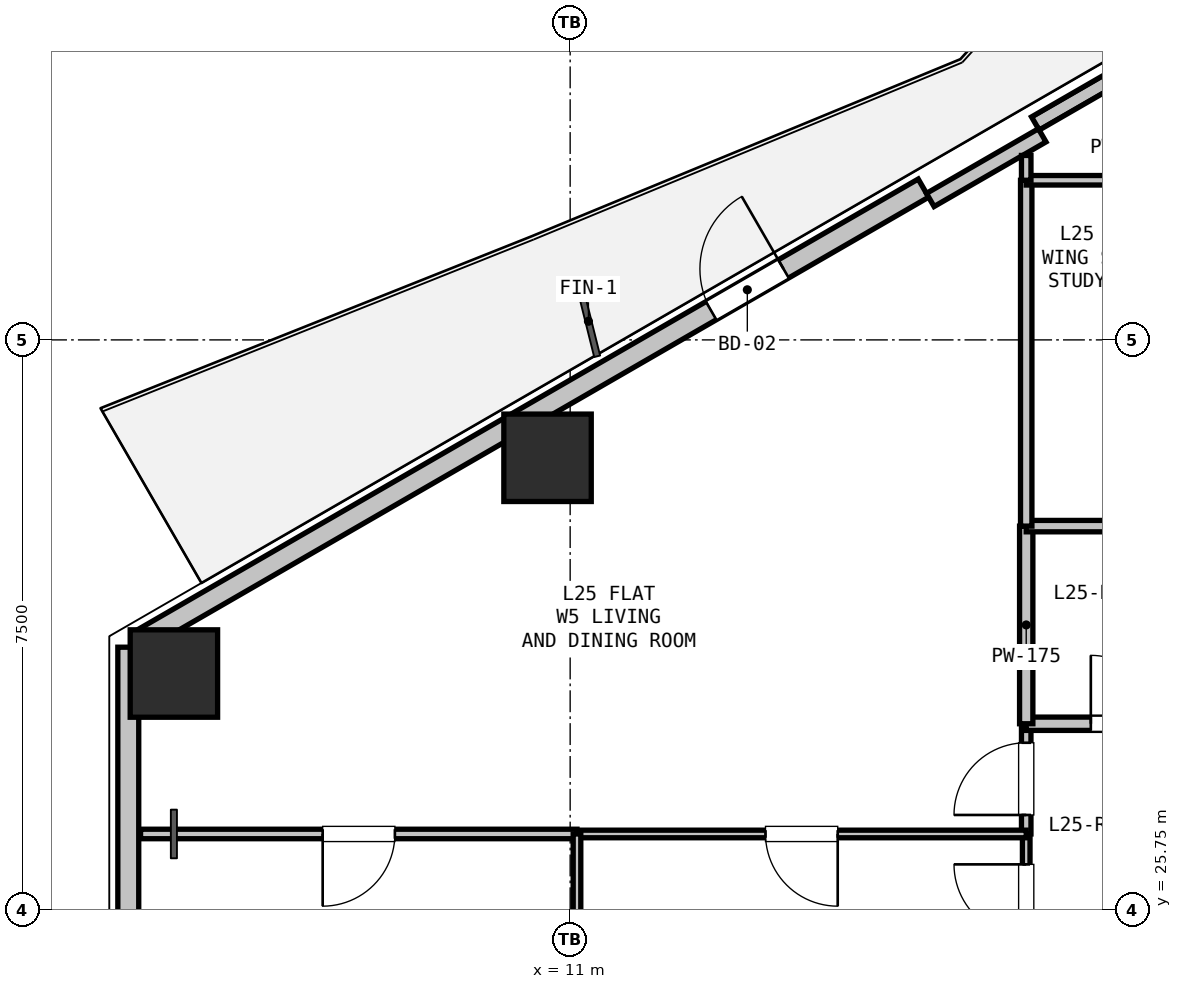
"""IFC4 building model, lengths in metres.
Left out: names, types, materials, properties, quantities, classifications, styles, units other than length and angle.
Written with IfcOpenShell. Run it as: python <this file> out.ifc"""

import sys

from ifc_helpers import new_model, si_unit, direction, frame, frame_2d, origin, origin_2d, place, context, subcontext, project, spatial, rectangle, hollow_rectangle, extrude, element, fill, save


model = new_model("IFC4")
c1 = context("Model", 3, precision=1e-05, world=origin(), true_north=direction((0.0, 1.0)))
c2 = subcontext(c1, "Body", "Model", "MODEL_VIEW")
j1 = project(units=[si_unit("LENGTHUNIT", "METRE"), si_unit("PLANEANGLEUNIT", "RADIAN")], contexts=[c1])
p1 = place(None, origin())
s1 = spatial("IfcSite", under=j1, at=p1, CompositionType="ELEMENT")
p2 = place(p1, origin())
s2 = spatial("IfcBuilding", under=s1, at=p2, CompositionType="ELEMENT")
p3 = place(p2, frame((0.0, 0.0, 93.3)))
s3 = spatial("IfcBuildingStorey", under=s2, at=p3, CompositionType="ELEMENT", Elevation=93.3)
for number, where, z_axis, x_axis in (
    (1, (5.787, 28.861, 0.0), (0.0, 0.0, 1.0), (1.0, 0.0, 0.0)),
    (2, (10.702, 31.699, 0.0), (0.0, 0.0, 1.0), (1.0, 0.0, 0.0)),
):
    element("IfcColumn", number, at=place(p3, frame(where, z_axis=z_axis, x_axis=x_axis)), inside=s3, PredefinedType="COLUMN", context=c2, shape_type="SweptSolid", body=[
        extrude(hollow_rectangle(XDim=1.15, YDim=1.15, WallThickness=0.032, at=origin_2d()), origin(), (0.0, 0.0, 1.0), 3.3),
    ])
p4 = place(p3, frame((5.187, 24.293, 0.0), z_axis=(0.0, 0.0, 1.0), x_axis=(0.0, 1.0, 0.0)))
e3 = element("IfcWall", 3, at=p4, inside=s3, PredefinedType="SOLIDWALL", context=c2, shape_type="SweptSolid", body=[
    extrude(rectangle(XDim=4.915, YDim=0.275, at=frame_2d((2.457, 0.0))), origin(), (0.0, 0.0, 1.0), 2.67),
])
p5 = place(p3, frame((5.317, 29.282, 0.0), z_axis=(0.0, 0.0, 1.0), x_axis=(0.866023023012, 0.500004123596, 0.0)))
e4 = element("IfcWall", 4, at=p5, inside=s3, PredefinedType="SOLIDWALL", context=c2, shape_type="SweptSolid", body=[
    extrude(rectangle(XDim=11.93, YDim=0.275, at=frame_2d((5.965, 0.0))), origin(), (0.0, 0.0, 1.0), 2.67),
])
p6 = place(p5, frame((8.704, 0.0, 0.0)))
e5 = element("IfcOpeningElement", 5, at=p6, cuts=e4, PredefinedType="OPENING", context=c2, shape_type="SweptSolid", body=[
    extrude(rectangle(XDim=1.1, YDim=2.1, at=frame_2d((0.55, 1.05))), frame((0.0, 0.147, 0.0), z_axis=(0.0, -1.0, 0.0), x_axis=(1.0, 0.0, 0.0)), (0.0, 0.0, 1.0), 0.295),
])
p7 = place(p3, frame((17.12, 36.097, 0.0), z_axis=(0.0, 0.0, 1.0), x_axis=(0.866027010039, 0.499997217876, 0.0)))
e6 = element("IfcWall", 6, at=p7, inside=s3, PredefinedType="PARAPET", context=c2, shape_type="SweptSolid", body=[
    extrude(rectangle(XDim=11.229, YDim=0.2, at=frame_2d((5.615, 0.0))), origin(), (0.0, 0.0, 1.0), 0.2),
])
p8 = place(p3, frame((15.738, 35.091, 0.0), z_axis=(0.0, 0.0, 1.0), x_axis=(0.866025371046, 0.500000056704, 0.0)))
e7 = element("IfcWall", 7, at=p8, inside=s3, PredefinedType="PARAPET", context=c2, shape_type="SweptSolid", body=[
    extrude(rectangle(XDim=1.7, YDim=0.2, at=frame_2d((0.85, 0.0))), origin(), (0.0, 0.0, 1.0), 2.67),
])
p9 = place(p3, frame((17.0, 25.0, 0.0), z_axis=(0.0, 0.0, 1.0), x_axis=(0.0, 1.0, 0.0)))
e8 = element("IfcWall", 8, at=p9, inside=s3, PredefinedType="PARTITIONING", context=c2, shape_type="SweptSolid", body=[
    extrude(rectangle(XDim=1.75, YDim=0.1, at=frame_2d((0.875, 0.0))), origin(), (0.0, 0.0, 1.0), 3.05),
])
p10 = place(p9, frame((0.4, 0.0, 0.0)))
e9 = element("IfcOpeningElement", 9, at=p10, cuts=e8, PredefinedType="OPENING", context=c2, shape_type="SweptSolid", body=[
    extrude(rectangle(XDim=0.95, YDim=2.1, at=frame_2d((0.475, 1.05))), frame((0.0, 0.06, 0.0), z_axis=(0.0, -1.0, 0.0), x_axis=(1.0, 0.0, 0.0)), (0.0, 0.0, 1.0), 0.12),
])
p11 = place(p3, frame((17.0, 26.75, 0.0), z_axis=(0.0, 0.0, 1.0), x_axis=(0.0, 1.0, 0.0)))
e10 = element("IfcWall", 10, at=p11, inside=s3, PredefinedType="PARTITIONING", context=c2, shape_type="SweptSolid", body=[
    extrude(rectangle(XDim=1.45, YDim=0.125, at=frame_2d((0.725, 0.0))), origin(), (0.0, 0.0, 1.0), 3.05),
])
p12 = place(p11, frame((0.25, 0.0, 0.0)))
e11 = element("IfcOpeningElement", 11, at=p12, cuts=e10, PredefinedType="OPENING", context=c2, shape_type="SweptSolid", body=[
    extrude(rectangle(XDim=0.95, YDim=2.1, at=frame_2d((0.475, 1.05))), frame((0.0, 0.073, 0.0), z_axis=(0.0, -1.0, 0.0), x_axis=(1.0, 0.0, 0.0)), (0.0, 0.0, 1.0), 0.145),
])
p13 = place(p3, frame((17.0, 28.2, 0.0), z_axis=(0.0, 0.0, 1.0), x_axis=(1.0, 0.0, 0.0)))
e12 = element("IfcWall", 12, at=p13, inside=s3, PredefinedType="PLUMBINGWALL", context=c2, shape_type="SweptSolid", body=[
    extrude(rectangle(XDim=2.6, YDim=0.175, at=frame_2d((1.3, 0.0))), origin(), (0.0, 0.0, 1.0), 3.05),
])
p14 = place(p13, frame((0.85, 0.0, 0.0)))
e13 = element("IfcOpeningElement", 13, at=p14, cuts=e12, PredefinedType="OPENING", context=c2, shape_type="SweptSolid", body=[
    extrude(rectangle(XDim=0.9, YDim=2.1, at=frame_2d((0.45, 1.05))), frame((0.0, 0.097, 0.0), z_axis=(0.0, -1.0, 0.0), x_axis=(1.0, 0.0, 0.0)), (0.0, 0.0, 1.0), 0.195),
])
p15 = place(p3, frame((17.0, 28.2, 0.0), z_axis=(0.0, 0.0, 1.0), x_axis=(0.0, 1.0, 0.0)))
e14 = element("IfcWall", 14, at=p15, inside=s3, PredefinedType="PLUMBINGWALL", context=c2, shape_type="SweptSolid", body=[
    extrude(rectangle(XDim=2.6, YDim=0.175, at=frame_2d((1.3, 0.0))), origin(), (0.0, 0.0, 1.0), 3.05),
])
p16 = place(p3, frame((17.0, 30.8, 0.0), z_axis=(0.0, 0.0, 1.0), x_axis=(1.0, 0.0, 0.0)))
e15 = element("IfcWall", 15, at=p16, inside=s3, PredefinedType="PARTITIONING", context=c2, shape_type="SweptSolid", body=[
    extrude(rectangle(XDim=2.6, YDim=0.15, at=frame_2d((1.3, 0.0))), origin(), (0.0, 0.0, 1.0), 3.05),
])
p17 = place(p3, frame((17.0, 30.8, 0.0), z_axis=(0.0, 0.0, 1.0), x_axis=(0.0, 1.0, 0.0)))
e16 = element("IfcWall", 16, at=p17, inside=s3, PredefinedType="PARTITIONING", context=c2, shape_type="SweptSolid", body=[
    extrude(rectangle(XDim=4.55, YDim=0.15, at=frame_2d((2.275, 0.0))), origin(), (0.0, 0.0, 1.0), 2.365),
])
p18 = place(p3, frame((17.0, 35.35, 0.0), z_axis=(0.0, 0.0, 1.0), x_axis=(1.0, 0.0, 0.0)))
e17 = element("IfcWall", 17, at=p18, inside=s3, PredefinedType="PARTITIONING", context=c2, shape_type="SweptSolid", body=[
    extrude(rectangle(XDim=2.6, YDim=0.125, at=frame_2d((1.3, 0.0))), origin(), (0.0, 0.0, 1.0), 2.365),
])
p19 = place(p3, frame((17.0, 35.677, 0.0), z_axis=(0.0, 0.0, 1.0), x_axis=(0.0, -1.0, 0.0)))
e18 = element("IfcWall", 18, at=p19, inside=s3, PredefinedType="PARTITIONING", context=c2, shape_type="SweptSolid", body=[
    extrude(rectangle(XDim=0.326, YDim=0.125, at=frame_2d((0.163, 0.0))), origin(), (0.0, 0.0, 1.0), 2.365),
])
p20 = place(p3, frame((17.0, 26.75, 0.0), z_axis=(0.0, 0.0, 1.0), x_axis=(-1.0, 0.0, 0.0)))
e19 = element("IfcWall", 19, at=p20, inside=s3, PredefinedType="PARTITIONING", context=c2, shape_type="SweptSolid", body=[
    extrude(rectangle(XDim=5.91, YDim=0.1, at=frame_2d((2.955, 0.0))), origin(), (0.0, 0.0, 1.0), 3.05),
])
p21 = place(p20, frame((2.48, 0.0, 0.0)))
e20 = element("IfcOpeningElement", 20, at=p21, cuts=e19, PredefinedType="OPENING", context=c2, shape_type="SweptSolid", body=[
    extrude(rectangle(XDim=0.95, YDim=2.1, at=frame_2d((0.475, 1.05))), frame((0.0, 0.06, 0.0), z_axis=(0.0, -1.0, 0.0), x_axis=(1.0, 0.0, 0.0)), (0.0, 0.0, 1.0), 0.12),
])
p22 = place(p3, frame((11.09, 26.75, 0.0), z_axis=(0.0, 0.0, 1.0), x_axis=(-1.0, 0.0, 0.0)))
e21 = element("IfcWall", 21, at=p22, inside=s3, PredefinedType="PARTITIONING", context=c2, shape_type="SweptSolid", body=[
    extrude(rectangle(XDim=5.742, YDim=0.125, at=frame_2d((2.871, 0.0))), origin(), (0.0, 0.0, 1.0), 2.714),
])
p23 = place(p22, frame((2.396, 0.0, 0.0)))
e22 = element("IfcOpeningElement", 22, at=p23, cuts=e21, PredefinedType="OPENING", context=c2, shape_type="SweptSolid", body=[
    extrude(rectangle(XDim=0.95, YDim=2.1, at=frame_2d((0.475, 1.05))), frame((0.0, 0.073, 0.0), z_axis=(0.0, -1.0, 0.0), x_axis=(1.0, 0.0, 0.0)), (0.0, 0.0, 1.0), 0.145),
])
p24 = place(p3, frame((11.09, 26.75, 0.0), z_axis=(0.0, 0.0, 1.0), x_axis=(0.0, -1.0, 0.0)))
e23 = element("IfcWall", 23, at=p24, inside=s3, PredefinedType="PARTITIONING", context=c2, shape_type="SweptSolid", body=[
    extrude(rectangle(XDim=5.679, YDim=0.1, at=frame_2d((2.839, 0.0))), origin(), (0.0, 0.0, 1.0), 2.423),
])
p25 = place(p24, frame((2.365, 0.0, 0.0)))
e24 = element("IfcOpeningElement", 24, at=p25, cuts=e23, PredefinedType="OPENING", context=c2, shape_type="SweptSolid", body=[
    extrude(rectangle(XDim=0.95, YDim=2.1, at=frame_2d((0.475, 1.05))), frame((0.0, 0.06, 0.0), z_axis=(0.0, -1.0, 0.0), x_axis=(1.0, 0.0, 0.0)), (0.0, 0.0, 1.0), 0.12),
])
p26 = place(p6, origin())
e25 = element("IfcDoor", 25, at=p26, inside=s3, OperationType="SINGLE_SWING_RIGHT", PredefinedType="DOOR", context=c2, shape_type="SweptSolid", body=[
    extrude(rectangle(XDim=1.1, YDim=2.1, at=frame_2d((0.55, 1.05))), frame((0.0, 0.025, 0.0), z_axis=(0.0, -1.0, 0.0), x_axis=(1.0, 0.0, 0.0)), (0.0, 0.0, 1.0), 0.05),
])
fill(e5, e25)
p27 = place(p14, origin())
e26 = element("IfcDoor", 26, at=p27, inside=s3, OperationType="SINGLE_SWING_LEFT", PredefinedType="DOOR", context=c2, shape_type="SweptSolid", body=[
    extrude(rectangle(XDim=0.9, YDim=2.1, at=frame_2d((0.45, 1.05))), frame((0.0, 0.025, 0.0), z_axis=(0.0, -1.0, 0.0), x_axis=(1.0, 0.0, 0.0)), (0.0, 0.0, 1.0), 0.05),
])
fill(e13, e26)
p28 = place(p12, origin())
e27 = element("IfcDoor", 27, at=p28, inside=s3, OperationType="SINGLE_SWING_LEFT", PredefinedType="DOOR", context=c2, shape_type="SweptSolid", body=[
    extrude(rectangle(XDim=0.95, YDim=2.1, at=frame_2d((0.475, 1.05))), frame((0.0, 0.025, 0.0), z_axis=(0.0, -1.0, 0.0), x_axis=(1.0, 0.0, 0.0)), (0.0, 0.0, 1.0), 0.05),
])
fill(e11, e27)
p29 = place(p10, origin())
e28 = element("IfcDoor", 28, at=p29, inside=s3, OperationType="SINGLE_SWING_RIGHT", PredefinedType="DOOR", context=c2, shape_type="SweptSolid", body=[
    extrude(rectangle(XDim=0.95, YDim=2.1, at=frame_2d((0.475, 1.05))), frame((0.0, 0.025, 0.0), z_axis=(0.0, -1.0, 0.0), x_axis=(1.0, 0.0, 0.0)), (0.0, 0.0, 1.0), 0.05),
])
fill(e9, e28)
p30 = place(p23, origin())
e29 = element("IfcDoor", 29, at=p30, inside=s3, OperationType="SINGLE_SWING_RIGHT", PredefinedType="DOOR", context=c2, shape_type="SweptSolid", body=[
    extrude(rectangle(XDim=0.95, YDim=2.1, at=frame_2d((0.475, 1.05))), frame((0.0, 0.025, 0.0), z_axis=(0.0, -1.0, 0.0), x_axis=(1.0, 0.0, 0.0)), (0.0, 0.0, 1.0), 0.05),
])
fill(e22, e29)
p31 = place(p21, origin())
e30 = element("IfcDoor", 30, at=p31, inside=s3, OperationType="SINGLE_SWING_LEFT", PredefinedType="DOOR", context=c2, shape_type="SweptSolid", body=[
    extrude(rectangle(XDim=0.95, YDim=2.1, at=frame_2d((0.475, 1.05))), frame((0.0, 0.025, 0.0), z_axis=(0.0, -1.0, 0.0), x_axis=(1.0, 0.0, 0.0)), (0.0, 0.0, 1.0), 0.05),
])
fill(e20, e30)
save(model, sys.argv[1])
